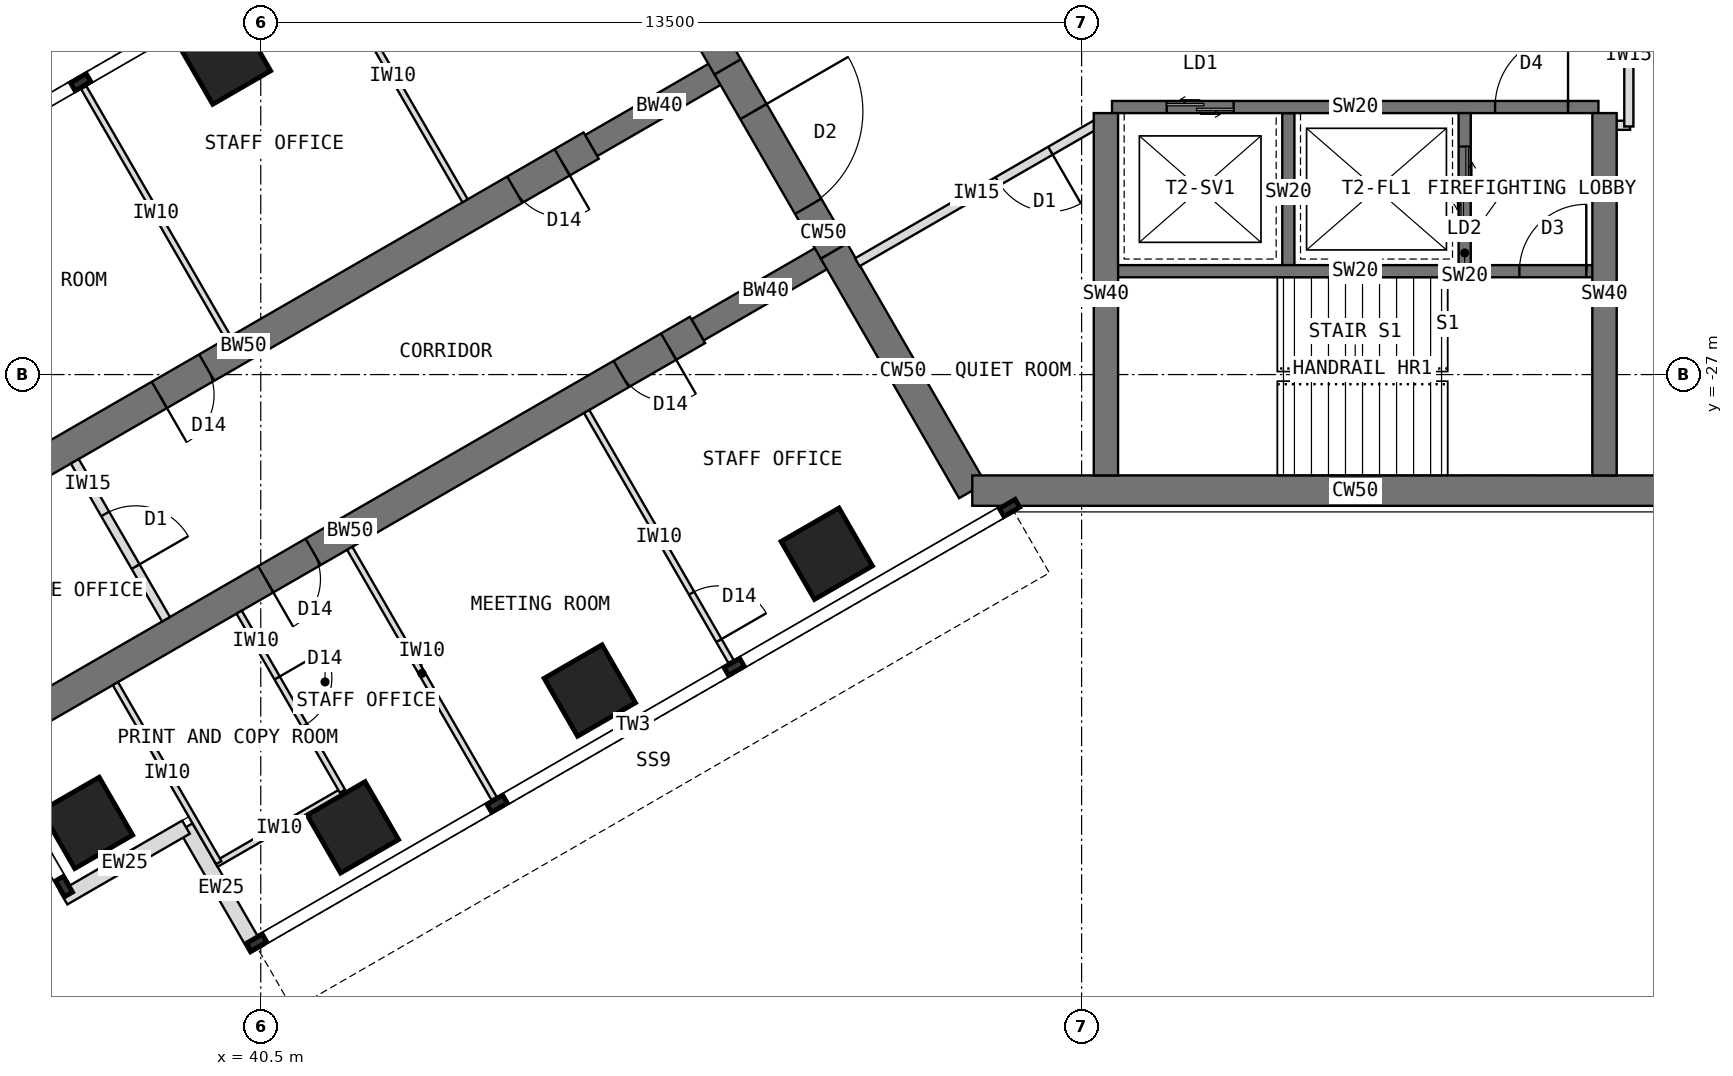
"""IFC4 building model, lengths in metres.
Left out: names, types, materials, properties, quantities, classifications, styles, units other than length and angle.
Written with IfcOpenShell. Run it as: python <this file> out.ifc"""

import sys

from ifc_helpers import new_model, si_unit, direction, frame, frame_2d, origin, origin_2d, place, context, subcontext, project, spatial, rectangle, extrude, element, fill, save


model = new_model("IFC4")
c1 = context("Model", 3, precision=1e-05, world=origin(), true_north=direction((0.0, 1.0)))
c2 = subcontext(c1, "Body", "Model", "MODEL_VIEW")
j1 = project(units=[si_unit("LENGTHUNIT", "METRE"), si_unit("PLANEANGLEUNIT", "RADIAN")], contexts=[c1])
p1 = place(None, origin())
s1 = spatial("IfcSite", under=j1, at=p1, CompositionType="ELEMENT")
p2 = place(p1, origin())
s2 = spatial("IfcBuilding", under=s1, at=p2, CompositionType="ELEMENT")
p3 = place(p2, frame((0.0, 0.0, 230.5)))
s3 = spatial("IfcBuildingStorey", under=s2, at=p3, CompositionType="ELEMENT", Elevation=230.5)
p4 = place(p3, frame((45.904, -18.0, 0.0), z_axis=(0.0, 0.0, 1.0), x_axis=(0.500024481964, -0.866011268655, 0.0)))
e1 = element("IfcWall", 1, at=p4, inside=s3, PredefinedType="SHEAR", context=c2, shape_type="SweptSolid", body=[
    extrude(rectangle(XDim=4.548, YDim=0.5, at=frame_2d((2.274, 0.0))), origin(), (0.0, 0.0, 1.0), 4.0),
])
p5 = place(p3, frame((48.178, -21.939, 0.0), z_axis=(0.0, 0.0, 1.0), x_axis=(0.500010275428, -0.866019471182, 0.0)))
e2 = element("IfcWall", 2, at=p5, inside=s3, PredefinedType="SHEAR", context=c2, shape_type="SweptSolid", body=[
    extrude(rectangle(XDim=3.5, YDim=0.5, at=frame_2d((1.75, 0.0))), origin(), (0.0, 0.0, 1.0), 4.0),
])
p6 = place(p5, frame((0.85, 0.0, 0.0)))
e3 = element("IfcOpeningElement", 3, at=p6, cuts=e2, PredefinedType="OPENING", context=c2, shape_type="SweptSolid", body=[
    extrude(rectangle(XDim=1.8, YDim=2.1, at=frame_2d((0.9, 1.05))), frame((0.0, 0.26, 0.0), z_axis=(0.0, -1.0, 0.0), x_axis=(1.0, 0.0, 0.0)), (0.0, 0.0, 1.0), 0.52),
])
p7 = place(p3, frame((49.928, -24.97, 0.0), z_axis=(0.0, 0.0, 1.0), x_axis=(0.499984222037, -0.866034513004, 0.0)))
e4 = element("IfcWall", 4, at=p7, inside=s3, PredefinedType="SHEAR", context=c2, shape_type="SweptSolid", body=[
    extrude(rectangle(XDim=4.548, YDim=0.5, at=frame_2d((2.274, 0.0))), origin(), (0.0, 0.0, 1.0), 4.0),
])
p8 = place(p3, frame((52.202, -28.908, 0.0), z_axis=(0.0, 0.0, 1.0), x_axis=(1.0, 0.0, 0.0)))
e5 = element("IfcWall", 5, at=p8, inside=s3, PredefinedType="SHEAR", context=c2, shape_type="SweptSolid", body=[
    extrude(rectangle(XDim=12.596, YDim=0.5, at=frame_2d((6.298, 0.0))), origin(), (0.0, 0.0, 1.0), 4.0),
])
p9 = place(p3, frame((49.928, -24.97, 0.0), z_axis=(0.0, 0.0, 1.0), x_axis=(-0.866031863473, -0.499988811324, 0.0)))
e6 = element("IfcWall", 6, at=p9, inside=s3, PredefinedType="SHEAR", context=c2, shape_type="SweptSolid", body=[
    extrude(rectangle(XDim=2.592, YDim=0.4, at=frame_2d((1.296, 0.0))), origin(), (0.0, 0.0, 1.0), 4.0),
])
p10 = place(p3, frame((47.684, -26.266, 0.0), z_axis=(0.0, 0.0, 1.0), x_axis=(-0.866027579429, -0.499996231654, 0.0)))
e7 = element("IfcWall", 7, at=p10, inside=s3, PredefinedType="SHEAR", context=c2, shape_type="SweptSolid", body=[
    extrude(rectangle(XDim=13.2, YDim=0.5, at=frame_2d((6.6, 0.0))), origin(), (0.0, 0.0, 1.0), 4.0),
])
p11 = place(p10, frame((0.55, 0.0, 0.0)))
e8 = element("IfcOpeningElement", 8, at=p11, cuts=e7, PredefinedType="OPENING", context=c2, shape_type="SweptSolid", body=[
    extrude(rectangle(XDim=0.9, YDim=2.1, at=frame_2d((0.45, 1.05))), frame((0.0, 0.26, 0.0), z_axis=(0.0, -1.0, 0.0), x_axis=(1.0, 0.0, 0.0)), (0.0, 0.0, 1.0), 0.52),
])
p12 = place(p10, frame((7.3, 0.0, 0.0)))
e9 = element("IfcOpeningElement", 9, at=p12, cuts=e7, PredefinedType="OPENING", context=c2, shape_type="SweptSolid", body=[
    extrude(rectangle(XDim=0.9, YDim=2.1, at=frame_2d((0.45, 1.05))), frame((0.0, 0.26, 0.0), z_axis=(0.0, -1.0, 0.0), x_axis=(1.0, 0.0, 0.0)), (0.0, 0.0, 1.0), 0.52),
])
p13 = place(p3, frame((48.178, -21.939, 0.0), z_axis=(0.0, 0.0, 1.0), x_axis=(-0.866072649678, -0.499918158782, 0.0)))
e10 = element("IfcWall", 10, at=p13, inside=s3, PredefinedType="SHEAR", context=c2, shape_type="SweptSolid", body=[
    extrude(rectangle(XDim=2.592, YDim=0.4, at=frame_2d((1.296, 0.0))), origin(), (0.0, 0.0, 1.0), 4.0),
])
p14 = place(p3, frame((45.934, -23.234, 0.0), z_axis=(0.0, 0.0, 1.0), x_axis=(-0.866019570528, -0.500010103361, 0.0)))
e11 = element("IfcWall", 11, at=p14, inside=s3, PredefinedType="SHEAR", context=c2, shape_type="SweptSolid", body=[
    extrude(rectangle(XDim=13.2, YDim=0.5, at=frame_2d((6.6, 0.0))), origin(), (0.0, 0.0, 1.0), 4.0),
])
p15 = place(p14, frame((0.55, 0.0, 0.0)))
e12 = element("IfcOpeningElement", 12, at=p15, cuts=e11, PredefinedType="OPENING", context=c2, shape_type="SweptSolid", body=[
    extrude(rectangle(XDim=0.9, YDim=2.1, at=frame_2d((0.45, 1.05))), frame((0.0, 0.26, 0.0), z_axis=(0.0, -1.0, 0.0), x_axis=(1.0, 0.0, 0.0)), (0.0, 0.0, 1.0), 0.52),
])
p16 = place(p14, frame((7.3, 0.0, 0.0)))
e13 = element("IfcOpeningElement", 13, at=p16, cuts=e11, PredefinedType="OPENING", context=c2, shape_type="SweptSolid", body=[
    extrude(rectangle(XDim=0.9, YDim=2.1, at=frame_2d((0.45, 1.05))), frame((0.0, 0.26, 0.0), z_axis=(0.0, -1.0, 0.0), x_axis=(1.0, 0.0, 0.0)), (0.0, 0.0, 1.0), 0.52),
])
for number, where, z_axis, x_axis in (
    (14, (49.809, -29.946, 0.0), (0.0, 0.0, 1.0), (0.866, 0.5, 0.0)),
    (15, (45.912, -32.196, 0.0), (0.0, 0.0, 1.0), (0.866, 0.5, 0.0)),
    (16, (39.912, -21.804, 0.0), (0.0, 0.0, 1.0), (0.866, 0.5, 0.0)),
    (17, (42.014, -34.446, 0.0), (0.0, 0.0, 1.0), (0.866, 0.5, 0.0)),
    (18, (37.642, -34.373, 0.0), (0.0, 0.0, 1.0), (0.866, 0.5, 0.0)),
):
    element("IfcColumn", number, at=place(p3, frame(where, z_axis=z_axis, x_axis=x_axis)), inside=s3, PredefinedType="COLUMN", context=c2, shape_type="SweptSolid", body=[
        extrude(rectangle(XDim=1.1, YDim=1.1, at=origin_2d()), origin(), (0.0, 0.0, 1.0), 4.0),
    ])
for number, where, z_axis, x_axis in (
    (19, (40.433, -36.456, 0.0), (0.0, 0.0, 1.0), (-0.5, 0.866, 0.0)),
    (20, (39.27, -34.443, 0.0), (0.0, 0.0, 1.0), (-0.866, -0.5, 0.0)),
):
    element("IfcWall", number, at=place(p3, frame(where, z_axis=z_axis, x_axis=x_axis)), inside=s3, PredefinedType="STANDARD", context=c2, shape_type="SweptSolid", body=[
        extrude(rectangle(XDim=2.325, YDim=0.25, at=frame_2d((1.163, 0.0))), origin(), (0.0, 0.0, 1.0), 3.8),
    ])
p17 = place(p3, frame((54.5, -22.6, 0.0), z_axis=(0.0, 0.0, 1.0), x_axis=(1.0, 0.0, 0.0)))
e21 = element("IfcWall", 21, at=p17, inside=s3, PredefinedType="SHEAR", context=c2, shape_type="SweptSolid", body=[
    extrude(rectangle(XDim=8.0, YDim=0.2, at=frame_2d((4.0, 0.0))), origin(), (0.0, 0.0, 1.0), 4.0),
])
p18 = place(p17, frame((6.3, 0.0, 0.0)))
e22 = element("IfcOpeningElement", 22, at=p18, cuts=e21, PredefinedType="OPENING", context=c2, shape_type="SweptSolid", body=[
    extrude(rectangle(XDim=1.2, YDim=2.1, at=frame_2d((0.6, 1.05))), frame((0.0, 0.11, 0.0), z_axis=(0.0, -1.0, 0.0), x_axis=(1.0, 0.0, 0.0)), (0.0, 0.0, 1.0), 0.22),
])
p19 = place(p17, frame((0.9, 0.0, 0.0)))
e23 = element("IfcOpeningElement", 23, at=p19, cuts=e21, PredefinedType="OPENING", context=c2, shape_type="SweptSolid", body=[
    extrude(rectangle(XDim=1.1, YDim=2.2, at=frame_2d((0.55, 1.1))), frame((0.0, 0.11, 0.0), z_axis=(0.0, -1.0, 0.0), x_axis=(1.0, 0.0, 0.0)), (0.0, 0.0, 1.0), 0.22),
])
p20 = place(p3, frame((57.4, -22.7, 0.0), z_axis=(0.0, 0.0, 1.0), x_axis=(0.0, -1.0, 0.0)))
e24 = element("IfcWall", 24, at=p20, inside=s3, PredefinedType="SHEAR", context=c2, shape_type="SweptSolid", body=[
    extrude(rectangle(XDim=2.6, YDim=0.2, at=frame_2d((1.3, 0.0))), origin(), (0.0, 0.0, 1.0), 4.0),
])
p21 = place(p3, frame((60.3, -22.7, 0.0), z_axis=(0.0, 0.0, 1.0), x_axis=(0.0, -1.0, 0.0)))
e25 = element("IfcWall", 25, at=p21, inside=s3, PredefinedType="SHEAR", context=c2, shape_type="SweptSolid", body=[
    extrude(rectangle(XDim=2.6, YDim=0.2, at=frame_2d((1.3, 0.0))), origin(), (0.0, 0.0, 1.0), 4.0),
])
p22 = place(p21, frame((0.55, 0.0, 0.0)))
e26 = element("IfcOpeningElement", 26, at=p22, cuts=e25, PredefinedType="OPENING", context=c2, shape_type="SweptSolid", body=[
    extrude(rectangle(XDim=1.3, YDim=2.2, at=frame_2d((0.65, 1.1))), frame((0.0, 0.11, 0.0), z_axis=(0.0, -1.0, 0.0), x_axis=(1.0, 0.0, 0.0)), (0.0, 0.0, 1.0), 0.22),
])
p23 = place(p3, frame((54.5, -25.3, 0.0), z_axis=(0.0, 0.0, 1.0), x_axis=(1.0, 0.0, 0.0)))
e27 = element("IfcWall", 27, at=p23, inside=s3, PredefinedType="SHEAR", context=c2, shape_type="SweptSolid", body=[
    extrude(rectangle(XDim=8.0, YDim=0.2, at=frame_2d((4.0, 0.0))), origin(), (0.0, 0.0, 1.0), 4.0),
])
p24 = place(p23, frame((6.7, 0.0, 0.0)))
e28 = element("IfcOpeningElement", 28, at=p24, cuts=e27, PredefinedType="OPENING", context=c2, shape_type="SweptSolid", body=[
    extrude(rectangle(XDim=1.1, YDim=2.1, at=frame_2d((0.55, 1.05))), frame((0.0, 0.11, 0.0), z_axis=(0.0, -1.0, 0.0), x_axis=(1.0, 0.0, 0.0)), (0.0, 0.0, 1.0), 0.22),
])
for number, where, z_axis, x_axis in (
    (29, (62.6, -22.7, 0.0), (0.0, 0.0, 1.0), (0.0, -1.0, 0.0)),
    (30, (54.4, -22.7, 0.0), (0.0, 0.0, 1.0), (0.0, -1.0, 0.0)),
):
    element("IfcWall", number, at=place(p3, frame(where, z_axis=z_axis, x_axis=x_axis)), inside=s3, PredefinedType="SHEAR", context=c2, shape_type="SweptSolid", body=[
        extrude(rectangle(XDim=5.958, YDim=0.4, at=frame_2d((2.979, 0.0))), origin(), (0.0, 0.0, 1.0), 4.0),
    ])
p25 = place(p3, frame((45.86, -27.607, 0.0), z_axis=(0.0, 0.0, 1.0), x_axis=(0.499986429846, -0.866033238375, 0.0)))
e31 = element("IfcWall", 31, at=p25, inside=s3, PredefinedType="PARTITIONING", context=c2, shape_type="SweptSolid", body=[
    extrude(rectangle(XDim=4.75, YDim=0.1, at=frame_2d((2.375, 0.0))), origin(), (0.0, 0.0, 1.0), 3.8),
])
p26 = place(p25, frame((3.45, 0.0, 0.0)))
e32 = element("IfcOpeningElement", 32, at=p26, cuts=e31, PredefinedType="OPENING", context=c2, shape_type="SweptSolid", body=[
    extrude(rectangle(XDim=0.9, YDim=2.1, at=frame_2d((0.45, 1.05))), frame((0.0, 0.06, 0.0), z_axis=(0.0, -1.0, 0.0), x_axis=(1.0, 0.0, 0.0)), (0.0, 0.0, 1.0), 0.12),
])
p27 = place(p3, frame((41.963, -29.857, 0.0), z_axis=(0.0, 0.0, 1.0), x_axis=(0.499986429846, -0.866033238375, 0.0)))
e33 = element("IfcWall", 33, at=p27, inside=s3, PredefinedType="PARTITIONING", context=c2, shape_type="SweptSolid", body=[
    extrude(rectangle(XDim=4.75, YDim=0.1, at=frame_2d((2.375, 0.0))), origin(), (0.0, 0.0, 1.0), 3.8),
])
p28 = place(p3, frame((41.844, -33.852, 0.0), z_axis=(0.0, 0.0, 1.0), x_axis=(-0.866024647952, -0.500001309137, 0.0)))
e34 = element("IfcWall", 34, at=p28, inside=s3, PredefinedType="PARTITIONING", context=c2, shape_type="SweptSolid", body=[
    extrude(rectangle(XDim=2.4, YDim=0.1, at=frame_2d((1.2, 0.0))), origin(), (0.0, 0.0, 1.0), 3.8),
])
p29 = place(p3, frame((40.144, -30.907, 0.0), z_axis=(0.0, 0.0, 1.0), x_axis=(0.499977295307, -0.866038511948, 0.0)))
e35 = element("IfcWall", 35, at=p29, inside=s3, PredefinedType="PARTITIONING", context=c2, shape_type="SweptSolid", body=[
    extrude(rectangle(XDim=3.4, YDim=0.1, at=frame_2d((1.7, 0.0))), origin(), (0.0, 0.0, 1.0), 3.8),
])
p30 = place(p29, frame((1.25, 0.0, 0.0)))
e36 = element("IfcOpeningElement", 36, at=p30, cuts=e35, PredefinedType="OPENING", context=c2, shape_type="SweptSolid", body=[
    extrude(rectangle(XDim=0.9, YDim=2.1, at=frame_2d((0.45, 1.05))), frame((0.0, 0.06, 0.0), z_axis=(0.0, -1.0, 0.0), x_axis=(1.0, 0.0, 0.0)), (0.0, 0.0, 1.0), 0.12),
])
p31 = place(p3, frame((38.109, -32.082, 0.0), z_axis=(0.0, 0.0, 1.0), x_axis=(0.499977295307, -0.866038511948, 0.0)))
e37 = element("IfcWall", 37, at=p31, inside=s3, PredefinedType="PARTITIONING", context=c2, shape_type="SweptSolid", body=[
    extrude(rectangle(XDim=3.4, YDim=0.1, at=frame_2d((1.7, 0.0))), origin(), (0.0, 0.0, 1.0), 3.8),
])
p32 = place(p3, frame((43.86, -24.143, 0.0), z_axis=(0.0, 0.0, 1.0), x_axis=(-0.499986429846, 0.866033238375, 0.0)))
e38 = element("IfcWall", 38, at=p32, inside=s3, PredefinedType="PARTITIONING", context=c2, shape_type="SweptSolid", body=[
    extrude(rectangle(XDim=4.75, YDim=0.1, at=frame_2d((2.375, 0.0))), origin(), (0.0, 0.0, 1.0), 3.8),
])
p33 = place(p32, frame((3.45, 0.0, 0.0)))
e39 = element("IfcOpeningElement", 39, at=p33, cuts=e38, PredefinedType="OPENING", context=c2, shape_type="SweptSolid", body=[
    extrude(rectangle(XDim=0.9, YDim=2.1, at=frame_2d((0.45, 1.05))), frame((0.0, 0.06, 0.0), z_axis=(0.0, -1.0, 0.0), x_axis=(1.0, 0.0, 0.0)), (0.0, 0.0, 1.0), 0.12),
])
p34 = place(p3, frame((39.963, -26.393, 0.0), z_axis=(0.0, 0.0, 1.0), x_axis=(-0.499986429846, 0.866033238375, 0.0)))
e40 = element("IfcWall", 40, at=p34, inside=s3, PredefinedType="PARTITIONING", context=c2, shape_type="SweptSolid", body=[
    extrude(rectangle(XDim=4.75, YDim=0.1, at=frame_2d((2.375, 0.0))), origin(), (0.0, 0.0, 1.0), 3.8),
])
p35 = place(p3, frame((63.02, -22.9, 0.0), z_axis=(0.0, 0.0, 1.0), x_axis=(-1.0, 0.0, 0.0)))
e41 = element("IfcWall", 41, at=p35, inside=s3, PredefinedType="PARTITIONING", context=c2, shape_type="SweptSolid", body=[
    extrude(rectangle(XDim=0.43, YDim=0.15, at=frame_2d((0.215, 0.0))), origin(), (0.0, 0.0, 1.0), 3.8),
])
p36 = place(p3, frame((54.23, -22.89, 0.0), z_axis=(0.0, 0.0, 1.0), x_axis=(-0.866006805923, -0.500032211057, 0.0)))
e42 = element("IfcWall", 42, at=p36, inside=s3, PredefinedType="PARTITIONING", context=c2, shape_type="SweptSolid", body=[
    extrude(rectangle(XDim=4.526, YDim=0.15, at=frame_2d((2.263, 0.0))), origin(), (0.0, 0.0, 1.0), 3.8),
])
p37 = place(p36, frame((0.858, 0.0, 0.0)))
e43 = element("IfcOpeningElement", 43, at=p37, cuts=e42, PredefinedType="OPENING", context=c2, shape_type="SweptSolid", body=[
    extrude(rectangle(XDim=1.0, YDim=2.1, at=frame_2d((0.5, 1.05))), frame((0.0, 0.085, 0.0), z_axis=(0.0, -1.0, 0.0), x_axis=(1.0, 0.0, 0.0)), (0.0, 0.0, 1.0), 0.17),
])
p38 = place(p3, frame((63.0, -20.578, 0.0), z_axis=(0.0, 0.0, 1.0), x_axis=(0.0, -1.0, 0.0)))
e44 = element("IfcWall", 44, at=p38, inside=s3, PredefinedType="PARTITIONING", context=c2, shape_type="SweptSolid", body=[
    extrude(rectangle(XDim=2.342, YDim=0.15, at=frame_2d((1.171, 0.0))), origin(), (0.0, 0.0, 1.0), 3.8),
])
p39 = place(p3, frame((37.442, -28.426, 0.0), z_axis=(0.0, 0.0, 1.0), x_axis=(0.50002537861, -0.866010750942, 0.0)))
e45 = element("IfcWall", 45, at=p39, inside=s3, PredefinedType="PARTITIONING", context=c2, shape_type="SweptSolid", body=[
    extrude(rectangle(XDim=3.0, YDim=0.15, at=frame_2d((1.5, 0.0))), origin(), (0.0, 0.0, 1.0), 3.8),
])
p40 = place(p39, frame((1.0, 0.0, 0.0)))
e46 = element("IfcOpeningElement", 46, at=p40, cuts=e45, PredefinedType="OPENING", context=c2, shape_type="SweptSolid", body=[
    extrude(rectangle(XDim=1.0, YDim=2.1, at=frame_2d((0.5, 1.05))), frame((0.0, 0.085, 0.0), z_axis=(0.0, -1.0, 0.0), x_axis=(1.0, 0.0, 0.0)), (0.0, 0.0, 1.0), 0.17),
])
p41 = place(p18, origin())
e47 = element("IfcDoor", 47, at=p41, inside=s3, OperationType="SINGLE_SWING_RIGHT", PredefinedType="DOOR", context=c2, shape_type="SweptSolid", body=[
    extrude(rectangle(XDim=1.2, YDim=2.1, at=frame_2d((0.6, 1.05))), frame((0.0, 0.025, 0.0), z_axis=(0.0, -1.0, 0.0), x_axis=(1.0, 0.0, 0.0)), (0.0, 0.0, 1.0), 0.05),
])
fill(e22, e47)
p42 = place(p22, origin())
e48 = element("IfcDoor", 48, at=p42, inside=s3, OperationType="DOUBLE_DOOR_SLIDING", PredefinedType="DOOR", context=c2, shape_type="SweptSolid", body=[
    extrude(rectangle(XDim=1.3, YDim=2.2, at=frame_2d((0.65, 1.1))), frame((0.0, 0.025, 0.0), z_axis=(0.0, -1.0, 0.0), x_axis=(1.0, 0.0, 0.0)), (0.0, 0.0, 1.0), 0.05),
])
fill(e26, e48)
p43 = place(p19, origin())
e49 = element("IfcDoor", 49, at=p43, inside=s3, OperationType="DOUBLE_DOOR_SLIDING", PredefinedType="DOOR", context=c2, shape_type="SweptSolid", body=[
    extrude(rectangle(XDim=1.1, YDim=2.2, at=frame_2d((0.55, 1.1))), frame((0.0, 0.025, 0.0), z_axis=(0.0, -1.0, 0.0), x_axis=(1.0, 0.0, 0.0)), (0.0, 0.0, 1.0), 0.05),
])
fill(e23, e49)
p44 = place(p24, origin())
e50 = element("IfcDoor", 50, at=p44, inside=s3, OperationType="SINGLE_SWING_RIGHT", PredefinedType="DOOR", context=c2, shape_type="SweptSolid", body=[
    extrude(rectangle(XDim=1.1, YDim=2.1, at=frame_2d((0.55, 1.05))), frame((0.0, 0.025, 0.0), z_axis=(0.0, -1.0, 0.0), x_axis=(1.0, 0.0, 0.0)), (0.0, 0.0, 1.0), 0.05),
])
fill(e28, e50)
p45 = place(p6, origin())
e51 = element("IfcDoor", 51, at=p45, inside=s3, OperationType="DOUBLE_DOOR_DOUBLE_SWING", PredefinedType="DOOR", context=c2, shape_type="SweptSolid", body=[
    extrude(rectangle(XDim=1.8, YDim=2.1, at=frame_2d((0.9, 1.05))), frame((0.0, 0.025, 0.0), z_axis=(0.0, -1.0, 0.0), x_axis=(1.0, 0.0, 0.0)), (0.0, 0.0, 1.0), 0.05),
])
fill(e3, e51)
p46 = place(p26, origin())
e52 = element("IfcDoor", 52, at=p46, inside=s3, OperationType="SINGLE_SWING_RIGHT", PredefinedType="DOOR", context=c2, shape_type="SweptSolid", body=[
    extrude(rectangle(XDim=0.9, YDim=2.1, at=frame_2d((0.45, 1.05))), frame((0.0, 0.025, 0.0), z_axis=(0.0, -1.0, 0.0), x_axis=(1.0, 0.0, 0.0)), (0.0, 0.0, 1.0), 0.05),
])
fill(e32, e52)
p47 = place(p30, origin())
e53 = element("IfcDoor", 53, at=p47, inside=s3, OperationType="SINGLE_SWING_LEFT", PredefinedType="DOOR", context=c2, shape_type="SweptSolid", body=[
    extrude(rectangle(XDim=0.9, YDim=2.1, at=frame_2d((0.45, 1.05))), frame((0.0, 0.025, 0.0), z_axis=(0.0, -1.0, 0.0), x_axis=(1.0, 0.0, 0.0)), (0.0, 0.0, 1.0), 0.05),
])
fill(e36, e53)
p48 = place(p37, origin())
e54 = element("IfcDoor", 54, at=p48, inside=s3, OperationType="SINGLE_SWING_LEFT", PredefinedType="DOOR", context=c2, shape_type="SweptSolid", body=[
    extrude(rectangle(XDim=1.0, YDim=2.1, at=frame_2d((0.5, 1.05))), frame((0.0, 0.025, 0.0), z_axis=(0.0, -1.0, 0.0), x_axis=(1.0, 0.0, 0.0)), (0.0, 0.0, 1.0), 0.05),
])
fill(e43, e54)
p49 = place(p40, origin())
e55 = element("IfcDoor", 55, at=p49, inside=s3, OperationType="SINGLE_SWING_RIGHT", PredefinedType="DOOR", context=c2, shape_type="SweptSolid", body=[
    extrude(rectangle(XDim=1.0, YDim=2.1, at=frame_2d((0.5, 1.05))), frame((0.0, 0.025, 0.0), z_axis=(0.0, -1.0, 0.0), x_axis=(1.0, 0.0, 0.0)), (0.0, 0.0, 1.0), 0.05),
])
fill(e46, e55)
p50 = place(p11, origin())
e56 = element("IfcDoor", 56, at=p50, inside=s3, OperationType="SINGLE_SWING_LEFT", PredefinedType="DOOR", context=c2, shape_type="SweptSolid", body=[
    extrude(rectangle(XDim=0.9, YDim=2.1, at=frame_2d((0.45, 1.05))), frame((0.0, 0.025, 0.0), z_axis=(0.0, -1.0, 0.0), x_axis=(1.0, 0.0, 0.0)), (0.0, 0.0, 1.0), 0.05),
])
fill(e8, e56)
p51 = place(p12, origin())
e57 = element("IfcDoor", 57, at=p51, inside=s3, OperationType="SINGLE_SWING_RIGHT", PredefinedType="DOOR", context=c2, shape_type="SweptSolid", body=[
    extrude(rectangle(XDim=0.9, YDim=2.1, at=frame_2d((0.45, 1.05))), frame((0.0, 0.025, 0.0), z_axis=(0.0, -1.0, 0.0), x_axis=(1.0, 0.0, 0.0)), (0.0, 0.0, 1.0), 0.05),
])
fill(e9, e57)
p52 = place(p15, origin())
e58 = element("IfcDoor", 58, at=p52, inside=s3, OperationType="SINGLE_SWING_LEFT", PredefinedType="DOOR", context=c2, shape_type="SweptSolid", body=[
    extrude(rectangle(XDim=0.9, YDim=2.1, at=frame_2d((0.45, 1.05))), frame((0.0, 0.025, 0.0), z_axis=(0.0, -1.0, 0.0), x_axis=(1.0, 0.0, 0.0)), (0.0, 0.0, 1.0), 0.05),
])
fill(e12, e58)
p53 = place(p16, origin())
e59 = element("IfcDoor", 59, at=p53, inside=s3, OperationType="SINGLE_SWING_RIGHT", PredefinedType="DOOR", context=c2, shape_type="SweptSolid", body=[
    extrude(rectangle(XDim=0.9, YDim=2.1, at=frame_2d((0.45, 1.05))), frame((0.0, 0.025, 0.0), z_axis=(0.0, -1.0, 0.0), x_axis=(1.0, 0.0, 0.0)), (0.0, 0.0, 1.0), 0.05),
])
fill(e13, e59)
save(model, sys.argv[1])
